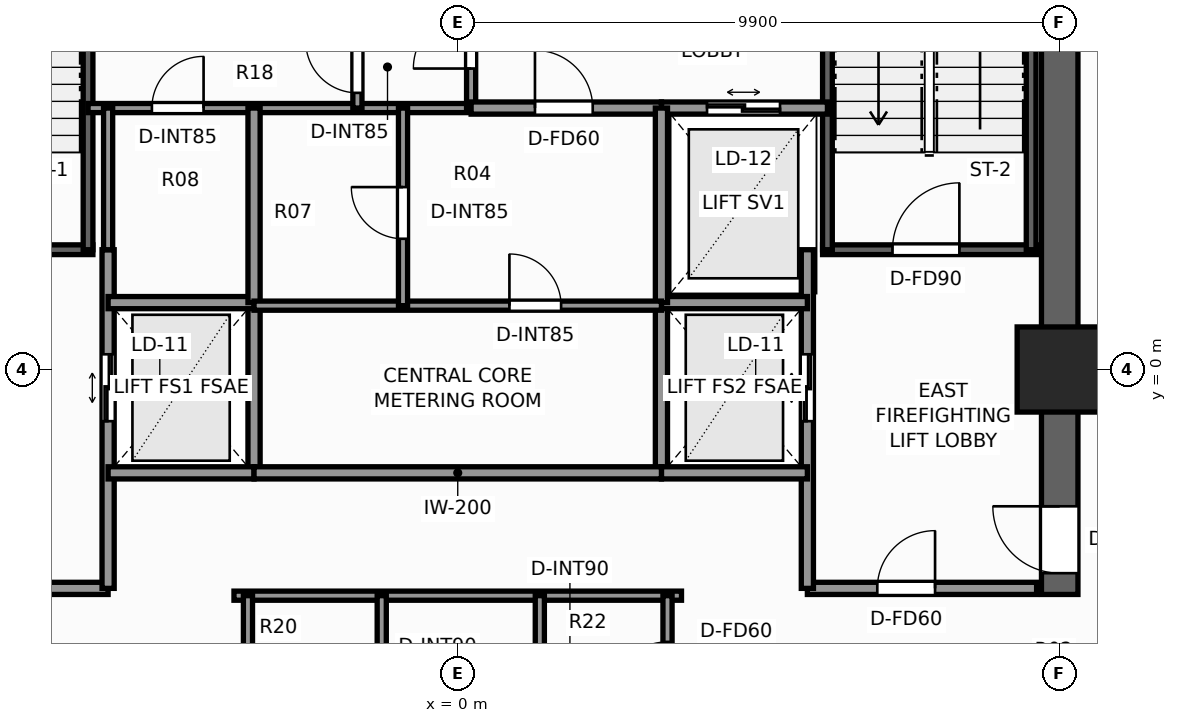
"""IFC4 building model, lengths in metres.
Left out: names, types, materials, properties, quantities, classifications, styles, units other than length and angle.
Written with IfcOpenShell. Run it as: python <this file> out.ifc"""

import sys

from ifc_helpers import new_model, si_unit, direction, frame, frame_2d, origin, origin_2d, place, context, subcontext, project, spatial, rectangle, extrude, element, fill, save


model = new_model("IFC4")
c1 = context("Model", 3, precision=1e-05, world=origin(), true_north=direction((0.0, 1.0)))
c2 = subcontext(c1, "Body", "Model", "MODEL_VIEW")
j1 = project(units=[si_unit("LENGTHUNIT", "METRE"), si_unit("PLANEANGLEUNIT", "RADIAN")], contexts=[c1])
p1 = place(None, origin())
s1 = spatial("IfcSite", under=j1, at=p1, CompositionType="ELEMENT")
p2 = place(p1, origin())
s2 = spatial("IfcBuilding", under=s1, at=p2, CompositionType="ELEMENT")
p3 = place(p2, frame((0.0, 0.0, 98.6)))
s3 = spatial("IfcBuildingStorey", under=s2, at=p3, CompositionType="ELEMENT", Elevation=98.6)
p4 = place(p3, frame((9.9, -3.7, 0.0), z_axis=(0.0, 0.0, 1.0), x_axis=(0.0, 1.0, 0.0)))
e1 = element("IfcWall", 1, at=p4, inside=s3, PredefinedType="SHEAR", context=c2, shape_type="SweptSolid", body=[
    extrude(rectangle(XDim=13.3, YDim=0.6, at=frame_2d((6.65, 0.0))), origin(), (0.0, 0.0, 1.0), 3.3),
])
p5 = place(p4, frame((0.35, 0.0, 0.0)))
e2 = element("IfcOpeningElement", 2, at=p5, cuts=e1, PredefinedType="OPENING", context=c2, shape_type="SweptSolid", body=[
    extrude(rectangle(XDim=1.1, YDim=2.2, at=frame_2d((0.55, 1.1))), frame((0.0, 0.31, 0.0), z_axis=(0.0, -1.0, 0.0), x_axis=(1.0, 0.0, 0.0)), (0.0, 0.0, 1.0), 0.62),
])
p6 = place(p3, frame((9.9, 0.0, 0.0), z_axis=(0.0, 0.0, 1.0), x_axis=(1.0, 0.0, 0.0)))
e3 = element("IfcColumn", 3, at=p6, inside=s3, PredefinedType="COLUMN", context=c2, shape_type="SweptSolid", body=[
    extrude(rectangle(XDim=1.4, YDim=1.4, at=origin_2d()), origin(), (0.0, 0.0, 1.0), 3.3),
])
p7 = place(p3, frame((-9.52, 1.97, 0.0), z_axis=(0.0, 0.0, 1.0), x_axis=(1.0, 0.0, 0.0)))
e4 = element("IfcWall", 4, at=p7, inside=s3, PredefinedType="SHEAR", context=c2, shape_type="SweptSolid", body=[
    extrude(rectangle(XDim=3.52, YDim=0.16, at=frame_2d((1.76, 0.0))), origin(), (0.0, 0.0, 1.0), 3.3),
])
p8 = place(p7, frame((1.15, 0.0, 0.0)))
e5 = element("IfcOpeningElement", 5, at=p8, cuts=e4, PredefinedType="OPENING", context=c2, shape_type="SweptSolid", body=[
    extrude(rectangle(XDim=1.1, YDim=2.2, at=frame_2d((0.55, 1.1))), frame((0.0, 0.09, 0.0), z_axis=(0.0, -1.0, 0.0), x_axis=(1.0, 0.0, 0.0)), (0.0, 0.0, 1.0), 0.18),
])
p9 = place(p3, frame((-6.08, 1.97, 0.0), z_axis=(0.0, 0.0, 1.0), x_axis=(0.0, 1.0, 0.0)))
e6 = element("IfcWall", 6, at=p9, inside=s3, PredefinedType="SHEAR", context=c2, shape_type="SweptSolid", body=[
    extrude(rectangle(XDim=7.56, YDim=0.16, at=frame_2d((3.78, 0.0))), origin(), (0.0, 0.0, 1.0), 3.3),
])
p10 = place(p3, frame((6.0, 1.97, 0.0), z_axis=(0.0, 0.0, 1.0), x_axis=(1.0, 0.0, 0.0)))
e7 = element("IfcWall", 7, at=p10, inside=s3, PredefinedType="SHEAR", context=c2, shape_type="SweptSolid", body=[
    extrude(rectangle(XDim=3.52, YDim=0.16, at=frame_2d((1.76, 0.0))), origin(), (0.0, 0.0, 1.0), 3.3),
])
p11 = place(p10, frame((1.15, 0.0, 0.0)))
e8 = element("IfcOpeningElement", 8, at=p11, cuts=e7, PredefinedType="OPENING", context=c2, shape_type="SweptSolid", body=[
    extrude(rectangle(XDim=1.1, YDim=2.2, at=frame_2d((0.55, 1.1))), frame((0.0, 0.09, 0.0), z_axis=(0.0, -1.0, 0.0), x_axis=(1.0, 0.0, 0.0)), (0.0, 0.0, 1.0), 0.18),
])
for number, where, z_axis, x_axis in (
    (9, (6.08, 1.97, 0.0), (0.0, 0.0, 1.0), (0.0, 1.0, 0.0)),
    (10, (9.43, 1.97, 0.0), (0.0, 0.0, 1.0), (0.0, 1.0, 0.0)),
):
    element("IfcWall", number, at=place(p3, frame(where, z_axis=z_axis, x_axis=x_axis)), inside=s3, PredefinedType="SHEAR", context=c2, shape_type="SweptSolid", body=[
        extrude(rectangle(XDim=7.56, YDim=0.16, at=frame_2d((3.78, 0.0))), origin(), (0.0, 0.0, 1.0), 3.3),
    ])
p12 = place(p3, frame((-9.52, -3.6, 0.0), z_axis=(0.0, 0.0, 1.0), x_axis=(1.0, 0.0, 0.0)))
e11 = element("IfcWall", 11, at=p12, inside=s3, PredefinedType="SOLIDWALL", context=c2, shape_type="SweptSolid", body=[
    extrude(rectangle(XDim=3.77, YDim=0.2, at=frame_2d((1.885, 0.0))), origin(), (0.0, 0.0, 1.0), 3.08),
])
p13 = place(p12, frame((1.15, 0.0, 0.0)))
e12 = element("IfcOpeningElement", 12, at=p13, cuts=e11, PredefinedType="OPENING", context=c2, shape_type="SweptSolid", body=[
    extrude(rectangle(XDim=0.95, YDim=2.06, at=frame_2d((0.475, 1.03))), frame((0.0, 0.11, 0.0), z_axis=(0.0, -1.0, 0.0), x_axis=(1.0, 0.0, 0.0)), (0.0, 0.0, 1.0), 0.22),
])
p14 = place(p3, frame((-5.75, -3.6, 0.0), z_axis=(0.0, 0.0, 1.0), x_axis=(0.0, 1.0, 0.0)))
e13 = element("IfcWall", 13, at=p14, inside=s3, PredefinedType="SOLIDWALL", context=c2, shape_type="SweptSolid", body=[
    extrude(rectangle(XDim=5.57, YDim=0.2, at=frame_2d((2.785, 0.0))), origin(), (0.0, 0.0, 1.0), 3.08),
])
p15 = place(p14, frame((2.75, 0.0, 0.0)))
e14 = element("IfcOpeningElement", 14, at=p15, cuts=e13, PredefinedType="OPENING", context=c2, shape_type="SweptSolid", body=[
    extrude(rectangle(XDim=1.1, YDim=2.2, at=frame_2d((0.55, 1.1))), frame((0.0, 0.11, 0.0), z_axis=(0.0, -1.0, 0.0), x_axis=(1.0, 0.0, 0.0)), (0.0, 0.0, 1.0), 0.22),
])
p16 = place(p3, frame((-3.35, -1.7, 0.0), z_axis=(0.0, 0.0, 1.0), x_axis=(0.0, 1.0, 0.0)))
e15 = element("IfcWall", 15, at=p16, inside=s3, PredefinedType="SOLIDWALL", context=c2, shape_type="SweptSolid", body=[
    extrude(rectangle(XDim=2.8, YDim=0.2, at=frame_2d((1.4, 0.0))), origin(), (0.0, 0.0, 1.0), 3.08),
])
for number, where, z_axis, x_axis in (
    (16, (-5.75, -1.7, 0.0), (0.0, 0.0, 1.0), (1.0, 0.0, 0.0)),
    (17, (-5.75, 1.1, 0.0), (0.0, 0.0, 1.0), (1.0, 0.0, 0.0)),
):
    element("IfcWall", number, at=place(p3, frame(where, z_axis=z_axis, x_axis=x_axis)), inside=s3, PredefinedType="SOLIDWALL", context=c2, shape_type="SweptSolid", body=[
        extrude(rectangle(XDim=2.4, YDim=0.2, at=frame_2d((1.2, 0.0))), origin(), (0.0, 0.0, 1.0), 3.08),
    ])
p17 = place(p3, frame((5.75, -3.6, 0.0), z_axis=(0.0, 0.0, 1.0), x_axis=(1.0, 0.0, 0.0)))
e18 = element("IfcWall", 18, at=p17, inside=s3, PredefinedType="SOLIDWALL", context=c2, shape_type="SweptSolid", body=[
    extrude(rectangle(XDim=3.77, YDim=0.2, at=frame_2d((1.885, 0.0))), origin(), (0.0, 0.0, 1.0), 3.08),
])
p18 = place(p17, frame((1.15, 0.0, 0.0)))
e19 = element("IfcOpeningElement", 19, at=p18, cuts=e18, PredefinedType="OPENING", context=c2, shape_type="SweptSolid", body=[
    extrude(rectangle(XDim=0.95, YDim=2.06, at=frame_2d((0.475, 1.03))), frame((0.0, 0.11, 0.0), z_axis=(0.0, -1.0, 0.0), x_axis=(1.0, 0.0, 0.0)), (0.0, 0.0, 1.0), 0.22),
])
p19 = place(p3, frame((5.75, -3.6, 0.0), z_axis=(0.0, 0.0, 1.0), x_axis=(0.0, 1.0, 0.0)))
e20 = element("IfcWall", 20, at=p19, inside=s3, PredefinedType="SOLIDWALL", context=c2, shape_type="SweptSolid", body=[
    extrude(rectangle(XDim=5.57, YDim=0.2, at=frame_2d((2.785, 0.0))), origin(), (0.0, 0.0, 1.0), 3.08),
])
p20 = place(p19, frame((2.75, 0.0, 0.0)))
e21 = element("IfcOpeningElement", 21, at=p20, cuts=e20, PredefinedType="OPENING", context=c2, shape_type="SweptSolid", body=[
    extrude(rectangle(XDim=1.1, YDim=2.2, at=frame_2d((0.55, 1.1))), frame((0.0, 0.11, 0.0), z_axis=(0.0, -1.0, 0.0), x_axis=(1.0, 0.0, 0.0)), (0.0, 0.0, 1.0), 0.22),
])
p21 = place(p3, frame((3.35, -1.7, 0.0), z_axis=(0.0, 0.0, 1.0), x_axis=(0.0, 1.0, 0.0)))
e22 = element("IfcWall", 22, at=p21, inside=s3, PredefinedType="SOLIDWALL", context=c2, shape_type="SweptSolid", body=[
    extrude(rectangle(XDim=2.8, YDim=0.2, at=frame_2d((1.4, 0.0))), origin(), (0.0, 0.0, 1.0), 3.08),
])
for number, where, z_axis, x_axis in (
    (23, (3.35, -1.7, 0.0), (0.0, 0.0, 1.0), (1.0, 0.0, 0.0)),
    (24, (3.35, 1.1, 0.0), (0.0, 0.0, 1.0), (1.0, 0.0, 0.0)),
):
    element("IfcWall", number, at=place(p3, frame(where, z_axis=z_axis, x_axis=x_axis)), inside=s3, PredefinedType="SOLIDWALL", context=c2, shape_type="SweptSolid", body=[
        extrude(rectangle(XDim=2.4, YDim=0.2, at=frame_2d((1.2, 0.0))), origin(), (0.0, 0.0, 1.0), 3.08),
    ])
p22 = place(p3, frame((3.35, 4.3, 0.0), z_axis=(0.0, 0.0, 1.0), x_axis=(1.0, 0.0, 0.0)))
e25 = element("IfcWall", 25, at=p22, inside=s3, PredefinedType="SOLIDWALL", context=c2, shape_type="SweptSolid", body=[
    extrude(rectangle(XDim=2.73, YDim=0.2, at=frame_2d((1.365, 0.0))), origin(), (0.0, 0.0, 1.0), 3.08),
])
p23 = place(p22, frame((0.75, 0.0, 0.0)))
e26 = element("IfcOpeningElement", 26, at=p23, cuts=e25, PredefinedType="OPENING", context=c2, shape_type="SweptSolid", body=[
    extrude(rectangle(XDim=1.2, YDim=2.25, at=frame_2d((0.6, 1.125))), frame((0.0, 0.11, 0.0), z_axis=(0.0, -1.0, 0.0), x_axis=(1.0, 0.0, 0.0)), (0.0, 0.0, 1.0), 0.22),
])
p24 = place(p3, frame((-6.08, 4.3, 0.0), z_axis=(0.0, 0.0, 1.0), x_axis=(1.0, 0.0, 0.0)))
e27 = element("IfcWall", 27, at=p24, inside=s3, PredefinedType="PARTITIONING", context=c2, shape_type="SweptSolid", body=[
    extrude(rectangle(XDim=6.3, YDim=0.15, at=frame_2d((3.15, 0.0))), origin(), (0.0, 0.0, 1.0), 3.08),
])
p25 = place(p24, frame((1.05, 0.0, 0.0)))
e28 = element("IfcOpeningElement", 28, at=p25, cuts=e27, PredefinedType="OPENING", context=c2, shape_type="SweptSolid", body=[
    extrude(rectangle(XDim=0.85, YDim=2.03, at=frame_2d((0.425, 1.015))), frame((0.0, 0.085, 0.0), z_axis=(0.0, -1.0, 0.0), x_axis=(1.0, 0.0, 0.0)), (0.0, 0.0, 1.0), 0.17),
])
p26 = place(p3, frame((0.22, 4.3, 0.0), z_axis=(0.0, 0.0, 1.0), x_axis=(0.0, 1.0, 0.0)))
e29 = element("IfcWall", 29, at=p26, inside=s3, PredefinedType="PARTITIONING", context=c2, shape_type="SweptSolid", body=[
    extrude(rectangle(XDim=5.22, YDim=0.15, at=frame_2d((2.61, 0.0))), origin(), (0.0, 0.0, 1.0), 3.08),
])
p27 = place(p26, frame((0.65, 0.0, 0.0)))
e30 = element("IfcOpeningElement", 30, at=p27, cuts=e29, PredefinedType="OPENING", context=c2, shape_type="SweptSolid", body=[
    extrude(rectangle(XDim=0.95, YDim=2.06, at=frame_2d((0.475, 1.03))), frame((0.0, 0.085, 0.0), z_axis=(0.0, -1.0, 0.0), x_axis=(1.0, 0.0, 0.0)), (0.0, 0.0, 1.0), 0.17),
])
p28 = place(p3, frame((-1.65, 4.3, 0.0), z_axis=(0.0, 0.0, 1.0), x_axis=(0.0, 1.0, 0.0)))
e31 = element("IfcWall", 31, at=p28, inside=s3, PredefinedType="PARTITIONING", context=c2, shape_type="SweptSolid", body=[
    extrude(rectangle(XDim=5.22, YDim=0.15, at=frame_2d((2.61, 0.0))), origin(), (0.0, 0.0, 1.0), 3.08),
])
p29 = place(p28, frame((2.2, 0.0, 0.0)))
e32 = element("IfcOpeningElement", 32, at=p29, cuts=e31, PredefinedType="OPENING", context=c2, shape_type="SweptSolid", body=[
    extrude(rectangle(XDim=0.85, YDim=2.03, at=frame_2d((0.425, 1.015))), frame((0.0, 0.085, 0.0), z_axis=(0.0, -1.0, 0.0), x_axis=(1.0, 0.0, 0.0)), (0.0, 0.0, 1.0), 0.17),
])
p30 = place(p28, frame((0.25, 0.0, 0.0)))
e33 = element("IfcOpeningElement", 33, at=p30, cuts=e31, PredefinedType="OPENING", context=c2, shape_type="SweptSolid", body=[
    extrude(rectangle(XDim=0.85, YDim=2.03, at=frame_2d((0.425, 1.015))), frame((0.0, 0.085, 0.0), z_axis=(0.0, -1.0, 0.0), x_axis=(1.0, 0.0, 0.0)), (0.0, 0.0, 1.0), 0.17),
])
p31 = place(p3, frame((0.22, 4.3, 0.0), z_axis=(0.0, 0.0, 1.0), x_axis=(1.0, 0.0, 0.0)))
e34 = element("IfcWall", 34, at=p31, inside=s3, PredefinedType="SOLIDWALL", context=c2, shape_type="SweptSolid", body=[
    extrude(rectangle(XDim=3.13, YDim=0.2, at=frame_2d((1.565, 0.0))), origin(), (0.0, 0.0, 1.0), 3.08),
])
p32 = place(p31, frame((1.05, 0.0, 0.0)))
e35 = element("IfcOpeningElement", 35, at=p32, cuts=e34, PredefinedType="OPENING", context=c2, shape_type="SweptSolid", body=[
    extrude(rectangle(XDim=0.95, YDim=2.06, at=frame_2d((0.475, 1.03))), frame((0.0, 0.11, 0.0), z_axis=(0.0, -1.0, 0.0), x_axis=(1.0, 0.0, 0.0)), (0.0, 0.0, 1.0), 0.22),
])
p33 = place(p3, frame((-3.35, -1.7, 0.0), z_axis=(0.0, 0.0, 1.0), x_axis=(1.0, 0.0, 0.0)))
e36 = element("IfcWall", 36, at=p33, inside=s3, PredefinedType="SOLIDWALL", context=c2, shape_type="SweptSolid", body=[
    extrude(rectangle(XDim=6.7, YDim=0.2, at=frame_2d((3.35, 0.0))), origin(), (0.0, 0.0, 1.0), 3.08),
])
for number, where, z_axis, x_axis in (
    (37, (-3.35, 1.1, 0.0), (0.0, 0.0, 1.0), (0.0, 1.0, 0.0)),
    (38, (3.35, 1.1, 0.0), (0.0, 0.0, 1.0), (0.0, 1.0, 0.0)),
):
    element("IfcWall", number, at=place(p3, frame(where, z_axis=z_axis, x_axis=x_axis)), inside=s3, PredefinedType="SOLIDWALL", context=c2, shape_type="SweptSolid", body=[
        extrude(rectangle(XDim=3.2, YDim=0.2, at=frame_2d((1.6, 0.0))), origin(), (0.0, 0.0, 1.0), 3.08),
    ])
p34 = place(p3, frame((-3.35, 1.05, 0.0), z_axis=(0.0, 0.0, 1.0), x_axis=(1.0, 0.0, 0.0)))
e39 = element("IfcWall", 39, at=p34, inside=s3, PredefinedType="PARTITIONING", context=c2, shape_type="SweptSolid", body=[
    extrude(rectangle(XDim=6.7, YDim=0.15, at=frame_2d((3.35, 0.0))), origin(), (0.0, 0.0, 1.0), 3.08),
])
p35 = place(p34, frame((4.2, 0.0, 0.0)))
e40 = element("IfcOpeningElement", 40, at=p35, cuts=e39, PredefinedType="OPENING", context=c2, shape_type="SweptSolid", body=[
    extrude(rectangle(XDim=0.85, YDim=2.03, at=frame_2d((0.425, 1.015))), frame((0.0, 0.085, 0.0), z_axis=(0.0, -1.0, 0.0), x_axis=(1.0, 0.0, 0.0)), (0.0, 0.0, 1.0), 0.17),
])
p36 = place(p3, frame((-0.9, 1.05, 0.0), z_axis=(0.0, 0.0, 1.0), x_axis=(0.0, 1.0, 0.0)))
e41 = element("IfcWall", 41, at=p36, inside=s3, PredefinedType="PARTITIONING", context=c2, shape_type="SweptSolid", body=[
    extrude(rectangle(XDim=3.25, YDim=0.15, at=frame_2d((1.625, 0.0))), origin(), (0.0, 0.0, 1.0), 3.08),
])
p37 = place(p36, frame((1.1, 0.0, 0.0)))
e42 = element("IfcOpeningElement", 42, at=p37, cuts=e41, PredefinedType="OPENING", context=c2, shape_type="SweptSolid", body=[
    extrude(rectangle(XDim=0.85, YDim=2.03, at=frame_2d((0.425, 1.015))), frame((0.0, 0.085, 0.0), z_axis=(0.0, -1.0, 0.0), x_axis=(1.0, 0.0, 0.0)), (0.0, 0.0, 1.0), 0.17),
])
p38 = place(p3, frame((-3.68, -3.72, 0.0), z_axis=(0.0, 0.0, 1.0), x_axis=(1.0, 0.0, 0.0)))
e43 = element("IfcWall", 43, at=p38, inside=s3, PredefinedType="PARTITIONING", context=c2, shape_type="SweptSolid", body=[
    extrude(rectangle(XDim=7.36, YDim=0.15, at=frame_2d((3.68, 0.0))), origin(), (0.0, 0.0, 1.0), 3.08),
])
p39 = place(p3, frame((3.45, -6.08, 0.0), z_axis=(0.0, 0.0, 1.0), x_axis=(0.0, 1.0, 0.0)))
e44 = element("IfcWall", 44, at=p39, inside=s3, PredefinedType="PARTITIONING", context=c2, shape_type="SweptSolid", body=[
    extrude(rectangle(XDim=2.36, YDim=0.15, at=frame_2d((1.18, 0.0))), origin(), (0.0, 0.0, 1.0), 3.08),
])
p40 = place(p39, frame((0.65, 0.0, 0.0)))
e45 = element("IfcOpeningElement", 45, at=p40, cuts=e44, PredefinedType="OPENING", context=c2, shape_type="SweptSolid", body=[
    extrude(rectangle(XDim=0.95, YDim=2.06, at=frame_2d((0.475, 1.03))), frame((0.0, 0.085, 0.0), z_axis=(0.0, -1.0, 0.0), x_axis=(1.0, 0.0, 0.0)), (0.0, 0.0, 1.0), 0.17),
])
p41 = place(p3, frame((-3.45, -6.08, 0.0), z_axis=(0.0, 0.0, 1.0), x_axis=(0.0, 1.0, 0.0)))
e46 = element("IfcWall", 46, at=p41, inside=s3, PredefinedType="PARTITIONING", context=c2, shape_type="SweptSolid", body=[
    extrude(rectangle(XDim=2.36, YDim=0.15, at=frame_2d((1.18, 0.0))), origin(), (0.0, 0.0, 1.0), 3.08),
])
p42 = place(p3, frame((1.35, -6.08, 0.0), z_axis=(0.0, 0.0, 1.0), x_axis=(0.0, 1.0, 0.0)))
e47 = element("IfcWall", 47, at=p42, inside=s3, PredefinedType="PARTITIONING", context=c2, shape_type="SweptSolid", body=[
    extrude(rectangle(XDim=2.36, YDim=0.15, at=frame_2d((1.18, 0.0))), origin(), (0.0, 0.0, 1.0), 3.08),
])
p43 = place(p42, frame((0.65, 0.0, 0.0)))
e48 = element("IfcOpeningElement", 48, at=p43, cuts=e47, PredefinedType="OPENING", context=c2, shape_type="SweptSolid", body=[
    extrude(rectangle(XDim=0.9, YDim=2.06, at=frame_2d((0.45, 1.03))), frame((0.0, 0.085, 0.0), z_axis=(0.0, -1.0, 0.0), x_axis=(1.0, 0.0, 0.0)), (0.0, 0.0, 1.0), 0.17),
])
p44 = place(p3, frame((-1.25, -6.08, 0.0), z_axis=(0.0, 0.0, 1.0), x_axis=(0.0, 1.0, 0.0)))
e49 = element("IfcWall", 49, at=p44, inside=s3, PredefinedType="PARTITIONING", context=c2, shape_type="SweptSolid", body=[
    extrude(rectangle(XDim=2.36, YDim=0.15, at=frame_2d((1.18, 0.0))), origin(), (0.0, 0.0, 1.0), 3.08),
])
p45 = place(p44, frame((0.65, 0.0, 0.0)))
e50 = element("IfcOpeningElement", 50, at=p45, cuts=e49, PredefinedType="OPENING", context=c2, shape_type="SweptSolid", body=[
    extrude(rectangle(XDim=0.9, YDim=2.06, at=frame_2d((0.45, 1.03))), frame((0.0, 0.085, 0.0), z_axis=(0.0, -1.0, 0.0), x_axis=(1.0, 0.0, 0.0)), (0.0, 0.0, 1.0), 0.17),
])
p46 = place(p3, frame((-5.75, 1.97, 0.0), z_axis=(0.0, 0.0, 1.0), x_axis=(0.0, 1.0, 0.0)))
e51 = element("IfcWall", 51, at=p46, inside=s3, PredefinedType="PARTITIONING", context=c2, shape_type="SweptSolid", body=[
    extrude(rectangle(XDim=2.33, YDim=0.15, at=frame_2d((1.165, 0.0))), origin(), (0.0, 0.0, 1.0), 3.08),
])
p47 = place(p11, origin())
e52 = element("IfcDoor", 52, at=p47, inside=s3, OperationType="SINGLE_SWING_RIGHT", PredefinedType="DOOR", context=c2, shape_type="SweptSolid", body=[
    extrude(rectangle(XDim=1.1, YDim=2.2, at=frame_2d((0.55, 1.1))), frame((0.0, 0.025, 0.0), z_axis=(0.0, -1.0, 0.0), x_axis=(1.0, 0.0, 0.0)), (0.0, 0.0, 1.0), 0.05),
])
fill(e8, e52)
p48 = place(p15, origin())
e53 = element("IfcDoor", 53, at=p48, inside=s3, OperationType="DOUBLE_DOOR_SLIDING", PredefinedType="DOOR", context=c2, shape_type="SweptSolid", body=[
    extrude(rectangle(XDim=1.1, YDim=2.2, at=frame_2d((0.55, 1.1))), frame((0.0, 0.025, 0.0), z_axis=(0.0, -1.0, 0.0), x_axis=(1.0, 0.0, 0.0)), (0.0, 0.0, 1.0), 0.05),
])
fill(e14, e53)
p49 = place(p5, origin())
e54 = element("IfcDoor", 54, at=p49, inside=s3, OperationType="SINGLE_SWING_RIGHT", PredefinedType="DOOR", context=c2, shape_type="SweptSolid", body=[
    extrude(rectangle(XDim=1.1, YDim=2.2, at=frame_2d((0.55, 1.1))), frame((0.0, 0.025, 0.0), z_axis=(0.0, -1.0, 0.0), x_axis=(1.0, 0.0, 0.0)), (0.0, 0.0, 1.0), 0.05),
])
fill(e2, e54)
p50 = place(p20, origin())
e55 = element("IfcDoor", 55, at=p50, inside=s3, OperationType="DOUBLE_DOOR_SLIDING", PredefinedType="DOOR", context=c2, shape_type="SweptSolid", body=[
    extrude(rectangle(XDim=1.1, YDim=2.2, at=frame_2d((0.55, 1.1))), frame((0.0, 0.025, 0.0), z_axis=(0.0, -1.0, 0.0), x_axis=(1.0, 0.0, 0.0)), (0.0, 0.0, 1.0), 0.05),
])
fill(e21, e55)
p51 = place(p23, origin())
e56 = element("IfcDoor", 56, at=p51, inside=s3, OperationType="DOUBLE_DOOR_SLIDING", PredefinedType="DOOR", context=c2, shape_type="SweptSolid", body=[
    extrude(rectangle(XDim=1.2, YDim=2.25, at=frame_2d((0.6, 1.125))), frame((0.0, 0.025, 0.0), z_axis=(0.0, -1.0, 0.0), x_axis=(1.0, 0.0, 0.0)), (0.0, 0.0, 1.0), 0.05),
])
fill(e26, e56)
p52 = place(p27, origin())
e57 = element("IfcDoor", 57, at=p52, inside=s3, OperationType="SINGLE_SWING_LEFT", PredefinedType="DOOR", context=c2, shape_type="SweptSolid", body=[
    extrude(rectangle(XDim=0.95, YDim=2.06, at=frame_2d((0.475, 1.03))), frame((0.0, 0.025, 0.0), z_axis=(0.0, -1.0, 0.0), x_axis=(1.0, 0.0, 0.0)), (0.0, 0.0, 1.0), 0.05),
])
fill(e30, e57)
p53 = place(p30, origin())
e58 = element("IfcDoor", 58, at=p53, inside=s3, OperationType="SINGLE_SWING_RIGHT", PredefinedType="DOOR", context=c2, shape_type="SweptSolid", body=[
    extrude(rectangle(XDim=0.85, YDim=2.03, at=frame_2d((0.425, 1.015))), frame((0.0, 0.025, 0.0), z_axis=(0.0, -1.0, 0.0), x_axis=(1.0, 0.0, 0.0)), (0.0, 0.0, 1.0), 0.05),
])
fill(e33, e58)
p54 = place(p18, origin())
e59 = element("IfcDoor", 59, at=p54, inside=s3, OperationType="SINGLE_SWING_RIGHT", PredefinedType="DOOR", context=c2, shape_type="SweptSolid", body=[
    extrude(rectangle(XDim=0.95, YDim=2.06, at=frame_2d((0.475, 1.03))), frame((0.0, 0.025, 0.0), z_axis=(0.0, -1.0, 0.0), x_axis=(1.0, 0.0, 0.0)), (0.0, 0.0, 1.0), 0.05),
])
fill(e19, e59)
p55 = place(p32, origin())
e60 = element("IfcDoor", 60, at=p55, inside=s3, OperationType="SINGLE_SWING_LEFT", PredefinedType="DOOR", context=c2, shape_type="SweptSolid", body=[
    extrude(rectangle(XDim=0.95, YDim=2.06, at=frame_2d((0.475, 1.03))), frame((0.0, 0.025, 0.0), z_axis=(0.0, -1.0, 0.0), x_axis=(1.0, 0.0, 0.0)), (0.0, 0.0, 1.0), 0.05),
])
fill(e35, e60)
p56 = place(p35, origin())
e61 = element("IfcDoor", 61, at=p56, inside=s3, OperationType="SINGLE_SWING_LEFT", PredefinedType="DOOR", context=c2, shape_type="SweptSolid", body=[
    extrude(rectangle(XDim=0.85, YDim=2.03, at=frame_2d((0.425, 1.015))), frame((0.0, 0.025, 0.0), z_axis=(0.0, -1.0, 0.0), x_axis=(1.0, 0.0, 0.0)), (0.0, 0.0, 1.0), 0.05),
])
fill(e40, e61)
p57 = place(p37, origin())
e62 = element("IfcDoor", 62, at=p57, inside=s3, OperationType="SINGLE_SWING_RIGHT", PredefinedType="DOOR", context=c2, shape_type="SweptSolid", body=[
    extrude(rectangle(XDim=0.85, YDim=2.03, at=frame_2d((0.425, 1.015))), frame((0.0, 0.025, 0.0), z_axis=(0.0, -1.0, 0.0), x_axis=(1.0, 0.0, 0.0)), (0.0, 0.0, 1.0), 0.05),
])
fill(e42, e62)
p58 = place(p40, origin())
e63 = element("IfcDoor", 63, at=p58, inside=s3, OperationType="SINGLE_SWING_LEFT", PredefinedType="DOOR", context=c2, shape_type="SweptSolid", body=[
    extrude(rectangle(XDim=0.95, YDim=2.06, at=frame_2d((0.475, 1.03))), frame((0.0, 0.025, 0.0), z_axis=(0.0, -1.0, 0.0), x_axis=(1.0, 0.0, 0.0)), (0.0, 0.0, 1.0), 0.05),
])
fill(e45, e63)
p59 = place(p25, origin())
e64 = element("IfcDoor", 64, at=p59, inside=s3, OperationType="SINGLE_SWING_RIGHT", PredefinedType="DOOR", context=c2, shape_type="SweptSolid", body=[
    extrude(rectangle(XDim=0.85, YDim=2.03, at=frame_2d((0.425, 1.015))), frame((0.0, 0.025, 0.0), z_axis=(0.0, -1.0, 0.0), x_axis=(1.0, 0.0, 0.0)), (0.0, 0.0, 1.0), 0.05),
])
fill(e28, e64)
save(model, sys.argv[1])
